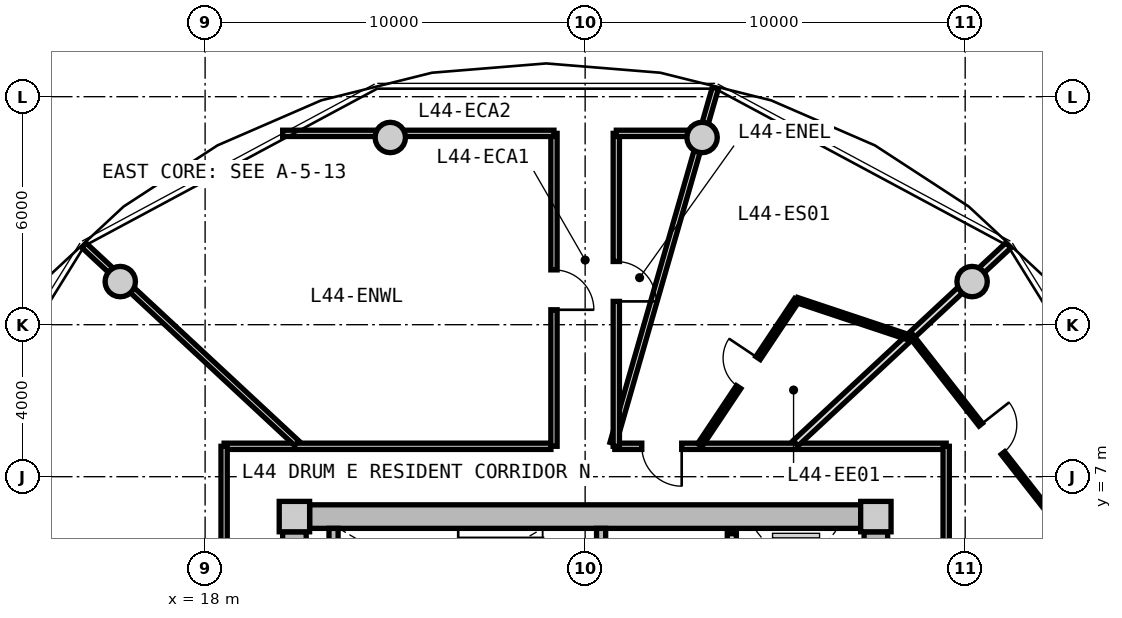
"""IFC4 building model, lengths in metres.
Left out: names, types, materials, properties, quantities, classifications, styles, units other than length and angle.
Written with IfcOpenShell. Run it as: python <this file> out.ifc"""

import sys

from ifc_helpers import new_model, si_unit, direction, frame, frame_2d, origin, origin_2d, place, context, subcontext, project, spatial, rectangle, circle, extrude, source, transform, mapped, element, fill, save


model = new_model("IFC4")
c1 = context("Model", 3, precision=1e-05, world=origin(), true_north=direction((0.0, 1.0)))
c2 = subcontext(c1, "Body", "Model", "MODEL_VIEW")
j1 = project(units=[si_unit("LENGTHUNIT", "METRE"), si_unit("PLANEANGLEUNIT", "RADIAN")], contexts=[c1])
p1 = place(None, origin())
s1 = spatial("IfcSite", under=j1, at=p1, CompositionType="ELEMENT")
p2 = place(p1, origin())
s2 = spatial("IfcBuilding", under=s1, at=p2, CompositionType="ELEMENT")
p3 = place(p2, frame((0.0, 0.0, 143.45)))
s3 = spatial("IfcBuildingStorey", under=s2, at=p3, CompositionType="ELEMENT", Elevation=143.45)
m1 = source(origin(), c2, "Body", "SweptSolid", [
    extrude(rectangle(XDim=0.8, YDim=0.8, at=origin_2d()), origin(), (0.0, 0.0, 1.0), 3.05),
])
for number, where, z_axis, x_axis in (
    (1, (35.65, 5.95, 0.0), (0.0, 0.0, 1.0), (1.0, 0.0, 0.0)),
    (2, (20.35, 5.95, 0.0), (0.0, 0.0, 1.0), (1.0, 0.0, 0.0)),
):
    element("IfcColumn", number, at=place(p3, frame(where, z_axis=z_axis, x_axis=x_axis)), inside=s3, PredefinedType="COLUMN", context=c2, shape_type="MappedRepresentation", body=[
        mapped(m1, transform((0.0, 0.0, 0.0), x_axis=(1.0, 0.0, 0.0), y_axis=(0.0, 1.0, 0.0), z_axis=(0.0, 0.0, 1.0), scale=1.0)),
    ])
m2 = source(origin(), c2, "Body", "SweptSolid", [
    extrude(rectangle(XDim=14.5, YDim=0.62, at=frame_2d((7.25, 0.0))), origin(), (0.0, 0.0, 1.0), 2.81),
])
p4 = place(p3, frame((20.75, 5.95, 0.0), z_axis=(0.0, 0.0, 1.0), x_axis=(1.0, 0.0, 0.0)))
e3 = element("IfcWall", 3, at=p4, inside=s3, PredefinedType="SHEAR", context=c2, shape_type="MappedRepresentation", body=[
    mapped(m2, transform((0.0, 0.0, 0.0), x_axis=(1.0, 0.0, 0.0), y_axis=(0.0, 1.0, 0.0), z_axis=(0.0, 0.0, 1.0), scale=1.0)),
])
m3 = source(origin(), c2, "Body", "SweptSolid", [
    extrude(rectangle(XDim=11.1, YDim=0.62, at=frame_2d((5.55, 0.0))), origin(), (0.0, 0.0, 1.0), 2.81),
])
p5 = place(p3, frame((20.35, -5.55, 0.0), z_axis=(0.0, 0.0, 1.0), x_axis=(0.0, 1.0, 0.0)))
e4 = element("IfcWall", 4, at=p5, inside=s3, PredefinedType="SHEAR", context=c2, shape_type="MappedRepresentation", body=[
    mapped(m3, transform((0.0, 0.0, 0.0), x_axis=(1.0, 0.0, 0.0), y_axis=(0.0, 1.0, 0.0), z_axis=(0.0, 0.0, 1.0), scale=1.0)),
])
p6 = place(p5, frame((3.8, 0.0, 0.0)))
e5 = element("IfcOpeningElement", 5, at=p6, cuts=e4, PredefinedType="OPENING", context=c2, shape_type="SweptSolid", body=[
    extrude(rectangle(XDim=1.2, YDim=2.15, at=frame_2d((0.6, 1.075))), frame((0.0, 0.32, 0.0), z_axis=(0.0, -1.0, 0.0), x_axis=(1.0, 0.0, 0.0)), (0.0, 0.0, 1.0), 0.64),
])
p7 = place(p3, frame((35.65, 5.55, 0.0), z_axis=(0.0, 0.0, 1.0), x_axis=(0.0, -1.0, 0.0)))
e6 = element("IfcWall", 6, at=p7, inside=s3, PredefinedType="SHEAR", context=c2, shape_type="MappedRepresentation", body=[
    mapped(m3, transform((0.0, 0.0, 0.0), x_axis=(1.0, 0.0, 0.0), y_axis=(0.0, 1.0, 0.0), z_axis=(0.0, 0.0, 1.0), scale=1.0)),
])
p8 = place(p7, frame((5.65, 0.0, 0.0)))
e7 = element("IfcOpeningElement", 7, at=p8, cuts=e6, PredefinedType="OPENING", context=c2, shape_type="SweptSolid", body=[
    extrude(rectangle(XDim=1.2, YDim=2.15, at=frame_2d((0.6, 1.075))), frame((0.0, 0.32, 0.0), z_axis=(0.0, -1.0, 0.0), x_axis=(1.0, 0.0, 0.0)), (0.0, 0.0, 1.0), 0.64),
])
m4 = source(origin(), c2, "Body", "SweptSolid", [
    extrude(circle(Radius=0.4, at=origin_2d()), origin(), (0.0, 0.0, 1.0), 3.05),
])
for number, where, z_axis, x_axis in (
    (8, (38.183, 12.135, 0.0), (0.0, 0.0, 1.0), (1.0, 0.0, 0.0)),
    (9, (31.077, 15.926, 0.0), (0.0, 0.0, 1.0), (1.0, 0.0, 0.0)),
    (10, (22.873, 15.926, 0.0), (0.0, 0.0, 1.0), (1.0, 0.0, 0.0)),
    (11, (15.767, 12.135, 0.0), (0.0, 0.0, 1.0), (1.0, 0.0, 0.0)),
):
    element("IfcColumn", number, at=place(p3, frame(where, z_axis=z_axis, x_axis=x_axis)), inside=s3, PredefinedType="COLUMN", context=c2, shape_type="MappedRepresentation", body=[
        mapped(m4, transform((0.0, 0.0, 0.0), x_axis=(1.0, 0.0, 0.0), y_axis=(0.0, 1.0, 0.0), z_axis=(0.0, 0.0, 1.0), scale=1.0)),
    ])
m5 = source(origin(), c2, "Body", "SweptSolid", [
    extrude(rectangle(XDim=3.19, YDim=0.24, at=frame_2d((1.595, 0.0))), origin(), (0.0, 0.0, 1.0), 2.81),
])
p9 = place(p3, frame((21.38, 2.45, 0.0), z_axis=(0.0, 0.0, 1.0), x_axis=(0.0, 1.0, 0.0)))
e12 = element("IfcWall", 12, at=p9, inside=s3, PredefinedType="PARTITIONING", context=c2, shape_type="MappedRepresentation", body=[
    mapped(m5, transform((0.0, 0.0, 0.0), x_axis=(1.0, 0.0, 0.0), y_axis=(0.0, 1.0, 0.0), z_axis=(0.0, 0.0, 1.0), scale=1.0)),
])
p10 = place(p3, frame((28.42, 2.45, 0.0), z_axis=(0.0, 0.0, 1.0), x_axis=(0.0, 1.0, 0.0)))
e13 = element("IfcWall", 13, at=p10, inside=s3, PredefinedType="PARTITIONING", context=c2, shape_type="MappedRepresentation", body=[
    mapped(m5, transform((0.0, 0.0, 0.0), x_axis=(1.0, 0.0, 0.0), y_axis=(0.0, 1.0, 0.0), z_axis=(0.0, 0.0, 1.0), scale=1.0)),
])
p11 = place(p10, frame((0.55, 0.0, 0.0)))
e14 = element("IfcOpeningElement", 14, at=p11, cuts=e13, PredefinedType="OPENING", context=c2, shape_type="SweptSolid", body=[
    extrude(rectangle(XDim=1.1, YDim=2.15, at=frame_2d((0.55, 1.075))), frame((0.0, 0.13, 0.0), z_axis=(0.0, -1.0, 0.0), x_axis=(1.0, 0.0, 0.0)), (0.0, 0.0, 1.0), 0.26),
])
m6 = source(origin(), c2, "Body", "SweptSolid", [
    extrude(rectangle(XDim=5.0, YDim=0.24, at=frame_2d((2.5, 0.0))), origin(), (0.0, 0.0, 1.0), 2.795),
])
p12 = place(p3, frame((31.86, 0.5, 0.0), z_axis=(0.0, 0.0, 1.0), x_axis=(0.0, 1.0, 0.0)))
e15 = element("IfcWall", 15, at=p12, inside=s3, PredefinedType="PARTITIONING", context=c2, shape_type="MappedRepresentation", body=[
    mapped(m6, transform((0.0, 0.0, 0.0), x_axis=(1.0, 0.0, 0.0), y_axis=(0.0, 1.0, 0.0), z_axis=(0.0, 0.0, 1.0), scale=1.0)),
])
p13 = place(p12, frame((3.05, 0.0, 0.0)))
e16 = element("IfcOpeningElement", 16, at=p13, cuts=e15, PredefinedType="OPENING", context=c2, shape_type="SweptSolid", body=[
    extrude(rectangle(XDim=1.3, YDim=2.2, at=frame_2d((0.65, 1.1))), frame((0.0, 0.13, 0.0), z_axis=(0.0, -1.0, 0.0), x_axis=(1.0, 0.0, 0.0)), (0.0, 0.0, 1.0), 0.26),
])
p14 = place(p12, frame((0.55, 0.0, 0.0)))
e17 = element("IfcOpeningElement", 17, at=p14, cuts=e15, PredefinedType="OPENING", context=c2, shape_type="SweptSolid", body=[
    extrude(rectangle(XDim=1.3, YDim=2.2, at=frame_2d((0.65, 1.1))), frame((0.0, 0.13, 0.0), z_axis=(0.0, -1.0, 0.0), x_axis=(1.0, 0.0, 0.0)), (0.0, 0.0, 1.0), 0.26),
])
m7 = source(origin(), c2, "Body", "SweptSolid", [
    extrude(rectangle(XDim=8.6, YDim=0.165, at=frame_2d((4.3, 0.0))), origin(), (0.0, 0.0, 1.0), 2.795),
])
p15 = place(p3, frame((18.5, 7.8, 0.0), z_axis=(0.0, 0.0, 1.0), x_axis=(1.0, 0.0, 0.0)))
e18 = element("IfcWall", 18, at=p15, inside=s3, PredefinedType="PARTITIONING", context=c2, shape_type="MappedRepresentation", body=[
    mapped(m7, transform((0.0, 0.0, 0.0), x_axis=(1.0, 0.0, 0.0), y_axis=(0.0, 1.0, 0.0), z_axis=(0.0, 0.0, 1.0), scale=1.0)),
])
m8 = source(origin(), c2, "Body", "SweptSolid", [
    extrude(rectangle(XDim=8.719, YDim=0.165, at=frame_2d((4.36, 0.0))), origin(), (0.0, 0.0, 1.0), 2.795),
])
p16 = place(p3, frame((28.781, 7.8, 0.0), z_axis=(0.0, 0.0, 1.0), x_axis=(1.0, 0.0, 0.0)))
e19 = element("IfcWall", 19, at=p16, inside=s3, PredefinedType="PARTITIONING", context=c2, shape_type="MappedRepresentation", body=[
    mapped(m8, transform((0.0, 0.0, 0.0), x_axis=(1.0, 0.0, 0.0), y_axis=(0.0, 1.0, 0.0), z_axis=(0.0, 0.0, 1.0), scale=1.0)),
])
p17 = place(p16, frame((0.71, 0.0, 0.0)))
e20 = element("IfcOpeningElement", 20, at=p17, cuts=e19, PredefinedType="OPENING", context=c2, shape_type="SweptSolid", body=[
    extrude(rectangle(XDim=1.05, YDim=2.15, at=frame_2d((0.525, 1.075))), frame((0.0, 0.093, 0.0), z_axis=(0.0, -1.0, 0.0), x_axis=(1.0, 0.0, 0.0)), (0.0, 0.0, 1.0), 0.185),
])
m9 = source(origin(), c2, "Body", "SweptSolid", [
    extrude(rectangle(XDim=15.6, YDim=0.165, at=frame_2d((7.8, 0.0))), origin(), (0.0, 0.0, 1.0), 2.795),
])
p18 = place(p3, frame((18.5, -7.8, 0.0), z_axis=(0.0, 0.0, 1.0), x_axis=(0.0, 1.0, 0.0)))
e21 = element("IfcWall", 21, at=p18, inside=s3, PredefinedType="PARTITIONING", context=c2, shape_type="MappedRepresentation", body=[
    mapped(m9, transform((0.0, 0.0, 0.0), x_axis=(1.0, 0.0, 0.0), y_axis=(0.0, 1.0, 0.0), z_axis=(0.0, 0.0, 1.0), scale=1.0)),
])
p19 = place(p18, frame((7.175, 0.0, 0.0)))
e22 = element("IfcOpeningElement", 22, at=p19, cuts=e21, PredefinedType="OPENING", context=c2, shape_type="SweptSolid", body=[
    extrude(rectangle(XDim=1.25, YDim=2.2, at=frame_2d((0.625, 1.1))), frame((0.0, 0.093, 0.0), z_axis=(0.0, -1.0, 0.0), x_axis=(1.0, 0.0, 0.0)), (0.0, 0.0, 1.0), 0.185),
])
p20 = place(p3, frame((37.5, 7.8, 0.0), z_axis=(0.0, 0.0, 1.0), x_axis=(0.0, -1.0, 0.0)))
e23 = element("IfcWall", 23, at=p20, inside=s3, PredefinedType="PARTITIONING", context=c2, shape_type="MappedRepresentation", body=[
    mapped(m9, transform((0.0, 0.0, 0.0), x_axis=(1.0, 0.0, 0.0), y_axis=(0.0, 1.0, 0.0), z_axis=(0.0, 0.0, 1.0), scale=1.0)),
])
p21 = place(p20, frame((5.687, 0.0, 0.0)))
e24 = element("IfcOpeningElement", 24, at=p21, cuts=e23, PredefinedType="OPENING", context=c2, shape_type="SweptSolid", body=[
    extrude(rectangle(XDim=1.05, YDim=2.15, at=frame_2d((0.525, 1.075))), frame((0.0, 0.093, 0.0), z_axis=(0.0, -1.0, 0.0), x_axis=(1.0, 0.0, 0.0)), (0.0, 0.0, 1.0), 0.185),
])
m10 = source(origin(), c2, "Body", "SweptSolid", [
    extrude(rectangle(XDim=9.73, YDim=0.165, at=frame_2d((4.865, 0.0))), origin(), (0.0, 0.0, 1.0), 2.345),
])
p22 = place(p3, frame((28.733, 7.88, 0.0), z_axis=(0.0, 0.0, 1.0), x_axis=(0.27679492614, 0.960929013436, 0.0)))
e25 = element("IfcWall", 25, at=p22, inside=s3, PredefinedType="PARTITIONING", context=c2, shape_type="MappedRepresentation", body=[
    mapped(m10, transform((0.0, 0.0, 0.0), x_axis=(1.0, 0.0, 0.0), y_axis=(0.0, 1.0, 0.0), z_axis=(0.0, 0.0, 1.0), scale=1.0)),
])
m11 = source(origin(), c2, "Body", "SweptSolid", [
    extrude(rectangle(XDim=7.648, YDim=0.165, at=frame_2d((3.824, 0.0))), origin(), (0.0, 0.0, 1.0), 2.345),
])
p23 = place(p3, frame((20.413, 7.88, 0.0), z_axis=(0.0, 0.0, 1.0), x_axis=(-0.732182665826, 0.681108320213, 0.0)))
e26 = element("IfcWall", 26, at=p23, inside=s3, PredefinedType="PARTITIONING", context=c2, shape_type="MappedRepresentation", body=[
    mapped(m11, transform((0.0, 0.0, 0.0), x_axis=(1.0, 0.0, 0.0), y_axis=(0.0, 1.0, 0.0), z_axis=(0.0, 0.0, 1.0), scale=1.0)),
])
m12 = source(origin(), c2, "Body", "SweptSolid", [
    extrude(rectangle(XDim=8.235, YDim=0.165, at=frame_2d((4.118, 0.0))), origin(), (0.0, 0.0, 1.0), 2.795),
])
p24 = place(p3, frame((27.18, 7.8, 0.0), z_axis=(0.0, 0.0, 1.0), x_axis=(0.0, 1.0, 0.0)))
e27 = element("IfcWall", 27, at=p24, inside=s3, PredefinedType="PARTITIONING", context=c2, shape_type="MappedRepresentation", body=[
    mapped(m12, transform((0.0, 0.0, 0.0), x_axis=(1.0, 0.0, 0.0), y_axis=(0.0, 1.0, 0.0), z_axis=(0.0, 0.0, 1.0), scale=1.0)),
])
p25 = place(p24, frame((3.593, 0.0, 0.0)))
e28 = element("IfcOpeningElement", 28, at=p25, cuts=e27, PredefinedType="OPENING", context=c2, shape_type="SweptSolid", body=[
    extrude(rectangle(XDim=1.05, YDim=2.15, at=frame_2d((0.525, 1.075))), frame((0.0, 0.093, 0.0), z_axis=(0.0, -1.0, 0.0), x_axis=(1.0, 0.0, 0.0)), (0.0, 0.0, 1.0), 0.185),
])
m13 = source(origin(), c2, "Body", "SweptSolid", [
    extrude(rectangle(XDim=7.139, YDim=0.165, at=frame_2d((3.569, 0.0))), origin(), (0.0, 0.0, 1.0), 2.345),
])
p26 = place(p3, frame((20.041, 16.035, 0.0), z_axis=(0.0, 0.0, 1.0), x_axis=(1.0, 0.0, 0.0)))
e29 = element("IfcWall", 29, at=p26, inside=s3, PredefinedType="PARTITIONING", context=c2, shape_type="MappedRepresentation", body=[
    mapped(m13, transform((0.0, 0.0, 0.0), x_axis=(1.0, 0.0, 0.0), y_axis=(0.0, 1.0, 0.0), z_axis=(0.0, 0.0, 1.0), scale=1.0)),
])
p27 = place(p3, frame((28.82, 7.8, 0.0), z_axis=(0.0, 0.0, 1.0), x_axis=(0.0, 1.0, 0.0)))
e30 = element("IfcWall", 30, at=p27, inside=s3, PredefinedType="PARTITIONING", context=c2, shape_type="MappedRepresentation", body=[
    mapped(m12, transform((0.0, 0.0, 0.0), x_axis=(1.0, 0.0, 0.0), y_axis=(0.0, 1.0, 0.0), z_axis=(0.0, 0.0, 1.0), scale=1.0)),
])
p28 = place(p27, frame((3.813, 0.0, 0.0)))
e31 = element("IfcOpeningElement", 31, at=p28, cuts=e30, PredefinedType="OPENING", context=c2, shape_type="SweptSolid", body=[
    extrude(rectangle(XDim=1.05, YDim=2.15, at=frame_2d((0.525, 1.075))), frame((0.0, 0.093, 0.0), z_axis=(0.0, -1.0, 0.0), x_axis=(1.0, 0.0, 0.0)), (0.0, 0.0, 1.0), 0.185),
])
m14 = source(origin(), c2, "Body", "SweptSolid", [
    extrude(rectangle(XDim=2.419, YDim=0.165, at=frame_2d((1.209, 0.0))), origin(), (0.0, 0.0, 1.0), 2.345),
])
p29 = place(p3, frame((28.82, 16.035, 0.0), z_axis=(0.0, 0.0, 1.0), x_axis=(1.0, 0.0, 0.0)))
e32 = element("IfcWall", 32, at=p29, inside=s3, PredefinedType="PARTITIONING", context=c2, shape_type="MappedRepresentation", body=[
    mapped(m14, transform((0.0, 0.0, 0.0), x_axis=(1.0, 0.0, 0.0), y_axis=(0.0, 1.0, 0.0), z_axis=(0.0, 0.0, 1.0), scale=1.0)),
])
m15 = source(origin(), c2, "Body", "SweptSolid", [
    extrude(rectangle(XDim=7.648, YDim=0.19, at=frame_2d((3.824, 0.0))), origin(), (0.0, 0.0, 1.0), 2.345),
])
p30 = place(p3, frame((33.538, 7.88, 0.0), z_axis=(0.0, 0.0, 1.0), x_axis=(0.732167856666, 0.681124239522, 0.0)))
e33 = element("IfcWall", 33, at=p30, inside=s3, PredefinedType="PARTITIONING", context=c2, shape_type="MappedRepresentation", body=[
    mapped(m15, transform((0.0, 0.0, 0.0), x_axis=(1.0, 0.0, 0.0), y_axis=(0.0, 1.0, 0.0), z_axis=(0.0, 0.0, 1.0), scale=1.0)),
])
m16 = source(origin(), c2, "Body", "SweptSolid", [
    extrude(rectangle(XDim=6.966, YDim=0.115, at=frame_2d((3.483, 0.0))), origin(), (0.0, 0.0, 1.0), 2.795),
])
p31 = place(p3, frame((40.85, 5.254, 0.0), z_axis=(0.0, 0.0, 1.0), x_axis=(-0.616695640563, 0.787201681217, 0.0)))
e34 = element("IfcWall", 34, at=p31, inside=s3, PredefinedType="PARTITIONING", context=c2, shape_type="MappedRepresentation", body=[
    mapped(m16, transform((0.0, 0.0, 0.0), x_axis=(1.0, 0.0, 0.0), y_axis=(0.0, 1.0, 0.0), z_axis=(0.0, 0.0, 1.0), scale=1.0)),
])
p32 = place(p31, frame((3.008, 0.0, 0.0)))
e35 = element("IfcOpeningElement", 35, at=p32, cuts=e34, PredefinedType="OPENING", context=c2, shape_type="SweptSolid", body=[
    extrude(rectangle(XDim=0.95, YDim=2.1, at=frame_2d((0.475, 1.05))), frame((0.0, 0.067, 0.0), z_axis=(0.0, -1.0, 0.0), x_axis=(1.0, 0.0, 0.0)), (0.0, 0.0, 1.0), 0.135),
])
m17 = source(origin(), c2, "Body", "SweptSolid", [
    extrude(rectangle(XDim=4.593, YDim=0.14, at=frame_2d((2.296, 0.0))), origin(), (0.0, 0.0, 1.0), 2.795),
])
p33 = place(p3, frame((31.019, 7.83, 0.0), z_axis=(0.0, 0.0, 1.0), x_axis=(0.555362412301, 0.831608436107, 0.0)))
e36 = element("IfcWall", 36, at=p33, inside=s3, PredefinedType="PARTITIONING", context=c2, shape_type="MappedRepresentation", body=[
    mapped(m17, transform((0.0, 0.0, 0.0), x_axis=(1.0, 0.0, 0.0), y_axis=(0.0, 1.0, 0.0), z_axis=(0.0, 0.0, 1.0), scale=1.0)),
])
p34 = place(p33, frame((1.836, 0.0, 0.0)))
e37 = element("IfcOpeningElement", 37, at=p34, cuts=e36, PredefinedType="OPENING", context=c2, shape_type="SweptSolid", body=[
    extrude(rectangle(XDim=0.92, YDim=2.1, at=frame_2d((0.46, 1.05))), frame((0.0, 0.08, 0.0), z_axis=(0.0, -1.0, 0.0), x_axis=(1.0, 0.0, 0.0)), (0.0, 0.0, 1.0), 0.16),
])
m18 = source(origin(), c2, "Body", "SweptSolid", [
    extrude(rectangle(XDim=3.077, YDim=0.14, at=frame_2d((1.538, 0.0))), origin(), (0.0, 0.0, 1.0), 2.795),
])
p35 = place(p3, frame((33.57, 11.65, 0.0), z_axis=(0.0, 0.0, 1.0), x_axis=(0.948635676976, -0.3163705934, 0.0)))
e38 = element("IfcWall", 38, at=p35, inside=s3, PredefinedType="PARTITIONING", context=c2, shape_type="MappedRepresentation", body=[
    mapped(m18, transform((0.0, 0.0, 0.0), x_axis=(1.0, 0.0, 0.0), y_axis=(0.0, 1.0, 0.0), z_axis=(0.0, 0.0, 1.0), scale=1.0)),
])
m19 = source(origin(), c2, "Body", "SweptSolid", [
    extrude(rectangle(XDim=1.05, YDim=2.15, at=frame_2d((0.525, 1.075))), frame((0.0, 0.025, 0.0), z_axis=(0.0, -1.0, 0.0), x_axis=(1.0, 0.0, 0.0)), (0.0, 0.0, 1.0), 0.05),
])
p36 = place(p25, frame((1.05, 0.0, 0.0), z_axis=(0.0, 0.0, 1.0), x_axis=(-1.0, 0.0, 0.0)))
e39 = element("IfcDoor", 39, at=p36, inside=s3, OperationType="SINGLE_SWING_RIGHT", PredefinedType="DOOR", context=c2, shape_type="MappedRepresentation", body=[
    mapped(m19, transform((0.0, 0.0, 0.0), x_axis=(1.0, 0.0, 0.0), y_axis=(0.0, 1.0, 0.0), z_axis=(0.0, 0.0, 1.0), scale=1.0)),
])
fill(e28, e39)
p37 = place(p28, frame((1.05, 0.0, 0.0), z_axis=(0.0, 0.0, 1.0), x_axis=(-1.0, 0.0, 0.0)))
e40 = element("IfcDoor", 40, at=p37, inside=s3, OperationType="SINGLE_SWING_RIGHT", PredefinedType="DOOR", context=c2, shape_type="MappedRepresentation", body=[
    mapped(m19, transform((0.0, 0.0, 0.0), x_axis=(1.0, 0.0, 0.0), y_axis=(0.0, 1.0, 0.0), z_axis=(0.0, 0.0, 1.0), scale=1.0)),
])
fill(e31, e40)
m20 = source(origin(), c2, "Body", "SweptSolid", [
    extrude(rectangle(XDim=0.95, YDim=2.1, at=frame_2d((0.475, 1.05))), frame((0.0, 0.025, 0.0), z_axis=(0.0, -1.0, 0.0), x_axis=(1.0, 0.0, 0.0)), (0.0, 0.0, 1.0), 0.05),
])
p38 = place(p32, frame((0.95, 0.0, 0.0), z_axis=(0.0, 0.0, 1.0), x_axis=(-1.0, 0.0, 0.0)))
e41 = element("IfcDoor", 41, at=p38, inside=s3, OperationType="SINGLE_SWING_LEFT", PredefinedType="DOOR", context=c2, shape_type="MappedRepresentation", body=[
    mapped(m20, transform((0.0, 0.0, 0.0), x_axis=(1.0, 0.0, 0.0), y_axis=(0.0, 1.0, 0.0), z_axis=(0.0, 0.0, 1.0), scale=1.0)),
])
fill(e35, e41)
p39 = place(p17, frame((1.05, 0.0, 0.0), z_axis=(0.0, 0.0, 1.0), x_axis=(-1.0, 0.0, 0.0)))
e42 = element("IfcDoor", 42, at=p39, inside=s3, OperationType="SINGLE_SWING_LEFT", PredefinedType="DOOR", context=c2, shape_type="MappedRepresentation", body=[
    mapped(m19, transform((0.0, 0.0, 0.0), x_axis=(1.0, 0.0, 0.0), y_axis=(0.0, 1.0, 0.0), z_axis=(0.0, 0.0, 1.0), scale=1.0)),
])
fill(e20, e42)
m21 = source(origin(), c2, "Body", "SweptSolid", [
    extrude(rectangle(XDim=0.92, YDim=2.1, at=frame_2d((0.46, 1.05))), frame((0.0, 0.025, 0.0), z_axis=(0.0, -1.0, 0.0), x_axis=(1.0, 0.0, 0.0)), (0.0, 0.0, 1.0), 0.05),
])
p40 = place(p34, origin())
e43 = element("IfcDoor", 43, at=p40, inside=s3, OperationType="SINGLE_SWING_RIGHT", PredefinedType="DOOR", context=c2, shape_type="MappedRepresentation", body=[
    mapped(m21, transform((0.0, 0.0, 0.0), x_axis=(1.0, 0.0, 0.0), y_axis=(0.0, 1.0, 0.0), z_axis=(0.0, 0.0, 1.0), scale=1.0)),
])
fill(e37, e43)
save(model, sys.argv[1])
